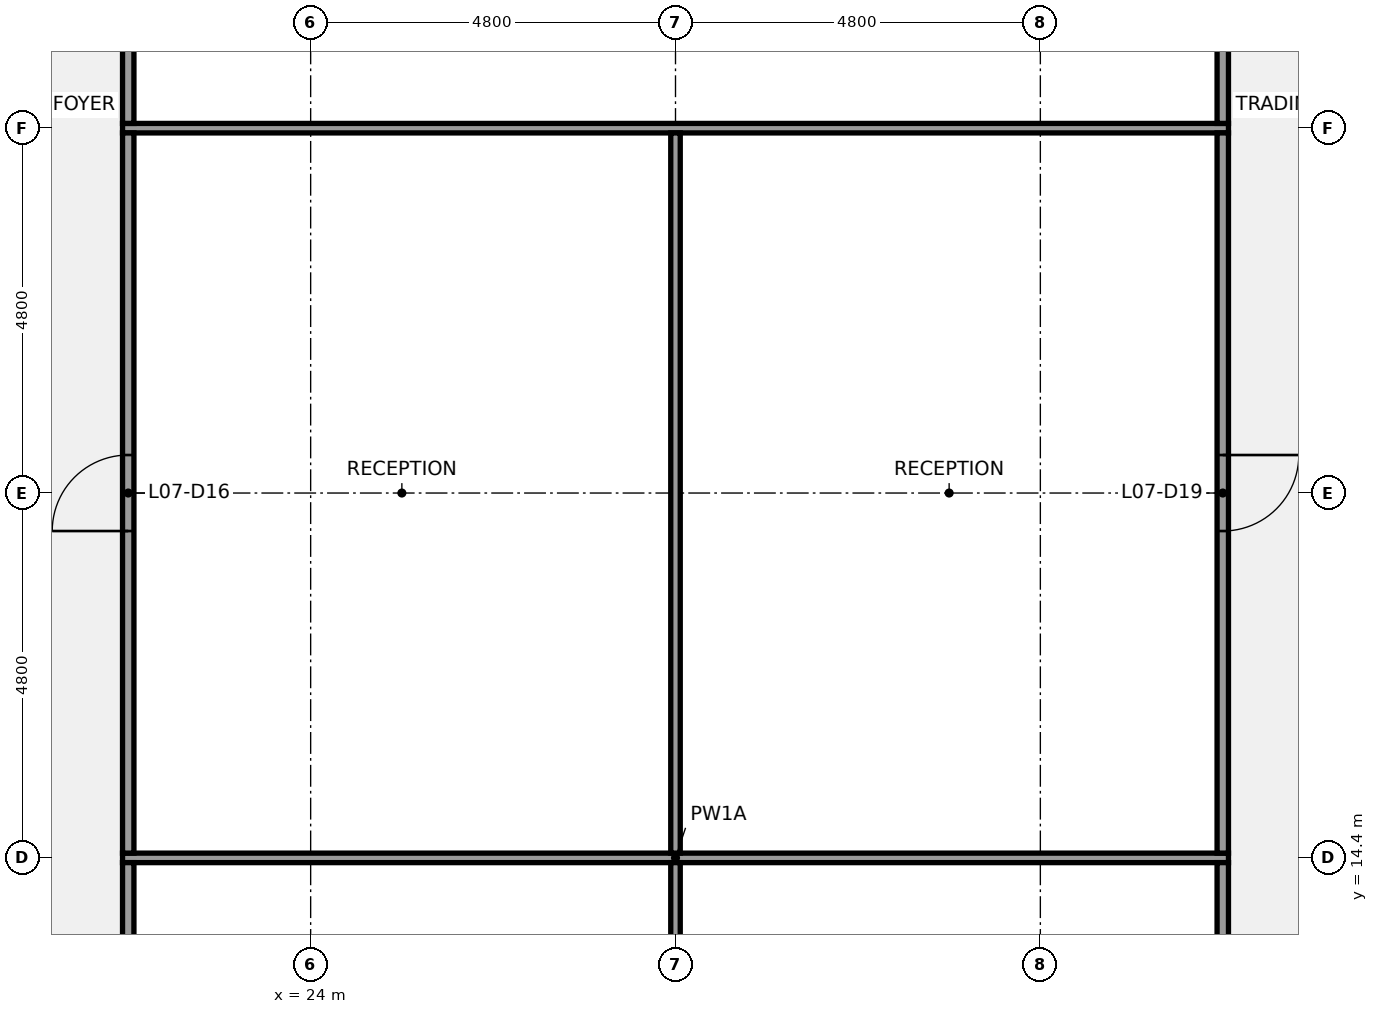
"""IFC4 building model, lengths in metres.
Left out: names, types, materials, properties, quantities, classifications, styles, units other than length and angle.
Written with IfcOpenShell. Run it as: python <this file> out.ifc"""

import sys

from ifc_helpers import new_model, si_unit, direction, frame, frame_2d, origin, place, context, subcontext, project, spatial, rectangle, extrude, element, fill, save


model = new_model("IFC4")
c1 = context("Model", 3, precision=1e-05, world=origin(), true_north=direction((0.0, 1.0)))
c2 = subcontext(c1, "Body", "Model", "MODEL_VIEW")
j1 = project(units=[si_unit("LENGTHUNIT", "METRE"), si_unit("PLANEANGLEUNIT", "RADIAN")], contexts=[c1])
p1 = place(None, origin())
s1 = spatial("IfcSite", under=j1, at=p1, CompositionType="ELEMENT")
p2 = place(p1, origin())
s2 = spatial("IfcBuilding", under=s1, at=p2, CompositionType="ELEMENT")
p3 = place(p2, frame((0.0, 0.0, 39.0)))
s3 = spatial("IfcBuildingStorey", under=s2, at=p3, CompositionType="ELEMENT", Elevation=39.0)
for number, where, z_axis, x_axis in (
    (1, (21.525, 14.4, 0.0), (0.0, 0.0, 1.0), (1.0, 0.0, 0.0)),
    (2, (21.525, 24.0, 0.0), (0.0, 0.0, 1.0), (1.0, 0.0, 0.0)),
):
    element("IfcWall", number, at=place(p3, frame(where, z_axis=z_axis, x_axis=x_axis)), inside=s3, PredefinedType="PARTITIONING", context=c2, shape_type="SweptSolid", body=[
        extrude(rectangle(XDim=14.55, YDim=0.125, at=frame_2d((7.275, 0.0))), origin(), (0.0, 0.0, 1.0), 2.87),
    ])
p4 = place(p3, frame((21.6, 7.275, 0.0), z_axis=(0.0, 0.0, 1.0), x_axis=(0.0, 1.0, 0.0)))
e3 = element("IfcWall", 3, at=p4, inside=s3, PredefinedType="PARTITIONING", context=c2, shape_type="SweptSolid", body=[
    extrude(rectangle(XDim=7.062, YDim=0.15, at=frame_2d((3.531, 0.0))), origin(), (0.0, 0.0, 1.0), 2.87),
])
p5 = place(p4, frame((3.031, 0.0, 0.0)))
e4 = element("IfcOpeningElement", 4, at=p5, cuts=e3, PredefinedType="OPENING", context=c2, shape_type="SweptSolid", body=[
    extrude(rectangle(XDim=1.0, YDim=2.1, at=frame_2d((0.5, 1.05))), frame((0.0, 0.085, 0.0), z_axis=(0.0, -1.0, 0.0), x_axis=(1.0, 0.0, 0.0)), (0.0, 0.0, 1.0), 0.17),
])
p6 = place(p3, frame((21.6, 14.462, 0.0), z_axis=(0.0, 0.0, 1.0), x_axis=(0.0, 1.0, 0.0)))
e5 = element("IfcWall", 5, at=p6, inside=s3, PredefinedType="PARTITIONING", context=c2, shape_type="SweptSolid", body=[
    extrude(rectangle(XDim=9.475, YDim=0.15, at=frame_2d((4.738, 0.0))), origin(), (0.0, 0.0, 1.0), 2.87),
])
p7 = place(p6, frame((4.238, 0.0, 0.0)))
e6 = element("IfcOpeningElement", 6, at=p7, cuts=e5, PredefinedType="OPENING", context=c2, shape_type="SweptSolid", body=[
    extrude(rectangle(XDim=1.0, YDim=2.1, at=frame_2d((0.5, 1.05))), frame((0.0, 0.085, 0.0), z_axis=(0.0, -1.0, 0.0), x_axis=(1.0, 0.0, 0.0)), (0.0, 0.0, 1.0), 0.17),
])
p8 = place(p3, frame((21.6, 24.062, 0.0), z_axis=(0.0, 0.0, 1.0), x_axis=(0.0, 1.0, 0.0)))
e7 = element("IfcWall", 7, at=p8, inside=s3, PredefinedType="PARTITIONING", context=c2, shape_type="SweptSolid", body=[
    extrude(rectangle(XDim=9.475, YDim=0.15, at=frame_2d((4.738, 0.0))), origin(), (0.0, 0.0, 1.0), 2.87),
])
p9 = place(p8, frame((4.238, 0.0, 0.0)))
e8 = element("IfcOpeningElement", 8, at=p9, cuts=e7, PredefinedType="OPENING", context=c2, shape_type="SweptSolid", body=[
    extrude(rectangle(XDim=1.0, YDim=2.1, at=frame_2d((0.5, 1.05))), frame((0.0, 0.085, 0.0), z_axis=(0.0, -1.0, 0.0), x_axis=(1.0, 0.0, 0.0)), (0.0, 0.0, 1.0), 0.17),
])
p10 = place(p3, frame((28.8, 7.275, 0.0), z_axis=(0.0, 0.0, 1.0), x_axis=(0.0, 1.0, 0.0)))
e9 = element("IfcWall", 9, at=p10, inside=s3, PredefinedType="PARTITIONING", context=c2, shape_type="SweptSolid", body=[
    extrude(rectangle(XDim=7.062, YDim=0.125, at=frame_2d((3.531, 0.0))), origin(), (0.0, 0.0, 1.0), 2.87),
])
p11 = place(p3, frame((28.8, 14.462, 0.0), z_axis=(0.0, 0.0, 1.0), x_axis=(0.0, 1.0, 0.0)))
e10 = element("IfcWall", 10, at=p11, inside=s3, PredefinedType="PARTITIONING", context=c2, shape_type="SweptSolid", body=[
    extrude(rectangle(XDim=9.475, YDim=0.125, at=frame_2d((4.738, 0.0))), origin(), (0.0, 0.0, 1.0), 2.87),
])
p12 = place(p3, frame((36.0, 7.275, 0.0), z_axis=(0.0, 0.0, 1.0), x_axis=(0.0, 1.0, 0.0)))
e11 = element("IfcWall", 11, at=p12, inside=s3, PredefinedType="PARTITIONING", context=c2, shape_type="SweptSolid", body=[
    extrude(rectangle(XDim=7.062, YDim=0.15, at=frame_2d((3.531, 0.0))), origin(), (0.0, 0.0, 1.0), 2.87),
])
p13 = place(p12, frame((3.031, 0.0, 0.0)))
e12 = element("IfcOpeningElement", 12, at=p13, cuts=e11, PredefinedType="OPENING", context=c2, shape_type="SweptSolid", body=[
    extrude(rectangle(XDim=1.0, YDim=2.1, at=frame_2d((0.5, 1.05))), frame((0.0, 0.085, 0.0), z_axis=(0.0, -1.0, 0.0), x_axis=(1.0, 0.0, 0.0)), (0.0, 0.0, 1.0), 0.17),
])
p14 = place(p3, frame((36.0, 14.462, 0.0), z_axis=(0.0, 0.0, 1.0), x_axis=(0.0, 1.0, 0.0)))
e13 = element("IfcWall", 13, at=p14, inside=s3, PredefinedType="PARTITIONING", context=c2, shape_type="SweptSolid", body=[
    extrude(rectangle(XDim=9.475, YDim=0.15, at=frame_2d((4.738, 0.0))), origin(), (0.0, 0.0, 1.0), 2.87),
])
p15 = place(p14, frame((4.238, 0.0, 0.0)))
e14 = element("IfcOpeningElement", 14, at=p15, cuts=e13, PredefinedType="OPENING", context=c2, shape_type="SweptSolid", body=[
    extrude(rectangle(XDim=1.0, YDim=2.1, at=frame_2d((0.5, 1.05))), frame((0.0, 0.085, 0.0), z_axis=(0.0, -1.0, 0.0), x_axis=(1.0, 0.0, 0.0)), (0.0, 0.0, 1.0), 0.17),
])
p16 = place(p3, frame((36.0, 24.062, 0.0), z_axis=(0.0, 0.0, 1.0), x_axis=(0.0, 1.0, 0.0)))
e15 = element("IfcWall", 15, at=p16, inside=s3, PredefinedType="PARTITIONING", context=c2, shape_type="SweptSolid", body=[
    extrude(rectangle(XDim=9.475, YDim=0.15, at=frame_2d((4.738, 0.0))), origin(), (0.0, 0.0, 1.0), 2.87),
])
p17 = place(p7, origin())
e16 = element("IfcDoor", 16, at=p17, inside=s3, OperationType="SINGLE_SWING_LEFT", PredefinedType="DOOR", context=c2, shape_type="SweptSolid", body=[
    extrude(rectangle(XDim=1.0, YDim=2.1, at=frame_2d((0.5, 1.05))), frame((0.0, 0.025, 0.0), z_axis=(0.0, -1.0, 0.0), x_axis=(1.0, 0.0, 0.0)), (0.0, 0.0, 1.0), 0.05),
])
fill(e6, e16)
p18 = place(p15, origin())
e17 = element("IfcDoor", 17, at=p18, inside=s3, OperationType="SINGLE_SWING_RIGHT", PredefinedType="DOOR", context=c2, shape_type="SweptSolid", body=[
    extrude(rectangle(XDim=1.0, YDim=2.1, at=frame_2d((0.5, 1.05))), frame((0.0, 0.025, 0.0), z_axis=(0.0, -1.0, 0.0), x_axis=(1.0, 0.0, 0.0)), (0.0, 0.0, 1.0), 0.05),
])
fill(e14, e17)
save(model, sys.argv[1])
